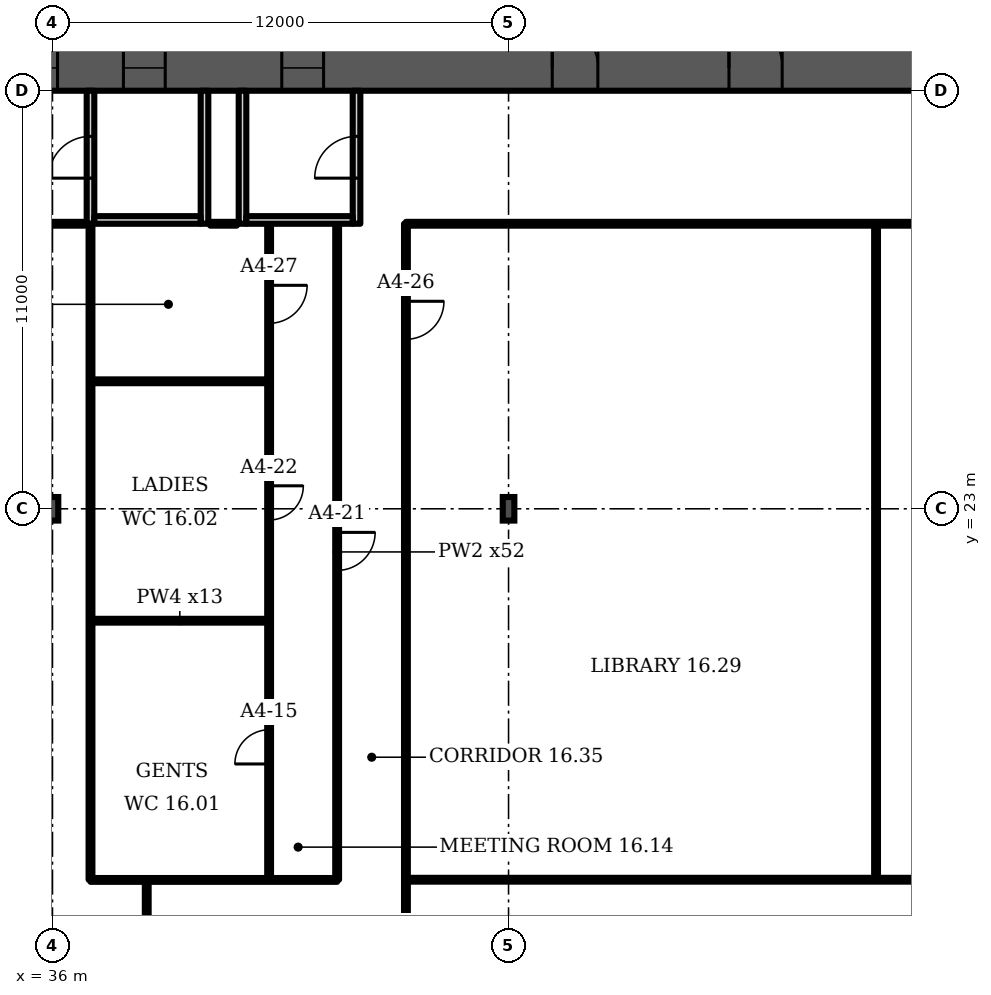
"""IFC4 building model, lengths in metres.
Left out: names, types, materials, properties, quantities, classifications, styles, units other than length and angle.
Written with IfcOpenShell. Run it as: python <this file> out.ifc"""

import sys

from ifc_helpers import new_model, si_unit, direction, frame, frame_2d, origin, origin_2d, place, context, subcontext, project, spatial, rectangle, i_section, extrude, element, fill, save


model = new_model("IFC4")
c1 = context("Model", 3, precision=1e-05, world=origin(), true_north=direction((0.0, 1.0)))
c2 = subcontext(c1, "Body", "Model", "MODEL_VIEW")
j1 = project(units=[si_unit("LENGTHUNIT", "METRE"), si_unit("PLANEANGLEUNIT", "RADIAN")], contexts=[c1])
p1 = place(None, origin())
s1 = spatial("IfcSite", under=j1, at=p1, CompositionType="ELEMENT")
p2 = place(p1, origin())
s2 = spatial("IfcBuilding", under=s1, at=p2, CompositionType="ELEMENT")
p3 = place(p2, frame((0.0, 0.0, 77.5)))
s3 = spatial("IfcBuildingStorey", under=s2, at=p3, CompositionType="ELEMENT", Elevation=77.5)
p4 = place(p3, frame((9.0, 34.6, 0.0), z_axis=(0.0, 0.0, 1.0), x_axis=(1.0, 0.0, 0.0)))
e1 = element("IfcWall", 1, at=p4, inside=s3, PredefinedType="SHEAR", context=c2, shape_type="SweptSolid", body=[
    extrude(rectangle(XDim=56.0, YDim=1.2, at=frame_2d((28.0, 0.0))), origin(), (0.0, 0.0, 1.0), 3.6),
])
p5 = place(p4, frame((3.3, 0.0, 0.0)))
e2 = element("IfcOpeningElement", 2, at=p5, cuts=e1, PredefinedType="OPENING", context=c2, shape_type="SweptSolid", body=[
    extrude(rectangle(XDim=1.0, YDim=2.1, at=frame_2d((0.5, 1.05))), frame((0.0, 0.61, 0.0), z_axis=(0.0, -1.0, 0.0), x_axis=(1.0, 0.0, 0.0)), (0.0, 0.0, 1.0), 1.22),
])
p6 = place(p4, frame((7.867, 0.0, 0.0)))
e3 = element("IfcOpeningElement", 3, at=p6, cuts=e1, PredefinedType="OPENING", context=c2, shape_type="SweptSolid", body=[
    extrude(rectangle(XDim=1.1, YDim=2.1, at=frame_2d((0.55, 1.05))), frame((0.0, 0.61, 0.0), z_axis=(0.0, -1.0, 0.0), x_axis=(1.0, 0.0, 0.0)), (0.0, 0.0, 1.0), 1.22),
])
p7 = place(p4, frame((12.033, 0.0, 0.0)))
e4 = element("IfcOpeningElement", 4, at=p7, cuts=e1, PredefinedType="OPENING", context=c2, shape_type="SweptSolid", body=[
    extrude(rectangle(XDim=1.1, YDim=2.1, at=frame_2d((0.55, 1.05))), frame((0.0, 0.61, 0.0), z_axis=(0.0, -1.0, 0.0), x_axis=(1.0, 0.0, 0.0)), (0.0, 0.0, 1.0), 1.22),
])
p8 = place(p4, frame((9.8, 0.0, 0.0)))
e5 = element("IfcOpeningElement", 5, at=p8, cuts=e1, PredefinedType="OPENING", context=c2, shape_type="SweptSolid", body=[
    extrude(rectangle(XDim=1.4, YDim=2.1, at=frame_2d((0.7, 1.05))), frame((0.0, 0.61, 0.0), z_axis=(0.0, -1.0, 0.0), x_axis=(1.0, 0.0, 0.0)), (0.0, 0.0, 1.0), 1.22),
])
p9 = place(p4, frame((14.65, 0.0, 0.0)))
e6 = element("IfcOpeningElement", 6, at=p9, cuts=e1, PredefinedType="OPENING", context=c2, shape_type="SweptSolid", body=[
    extrude(rectangle(XDim=1.2, YDim=2.1, at=frame_2d((0.6, 1.05))), frame((0.0, 0.61, 0.0), z_axis=(0.0, -1.0, 0.0), x_axis=(1.0, 0.0, 0.0)), (0.0, 0.0, 1.0), 1.22),
])
p10 = place(p4, frame((21.867, 0.0, 0.0)))
e7 = element("IfcOpeningElement", 7, at=p10, cuts=e1, PredefinedType="OPENING", context=c2, shape_type="SweptSolid", body=[
    extrude(rectangle(XDim=1.1, YDim=2.1, at=frame_2d((0.55, 1.05))), frame((0.0, 0.61, 0.0), z_axis=(0.0, -1.0, 0.0), x_axis=(1.0, 0.0, 0.0)), (0.0, 0.0, 1.0), 1.22),
])
p11 = place(p4, frame((26.033, 0.0, 0.0)))
e8 = element("IfcOpeningElement", 8, at=p11, cuts=e1, PredefinedType="OPENING", context=c2, shape_type="SweptSolid", body=[
    extrude(rectangle(XDim=1.1, YDim=2.1, at=frame_2d((0.55, 1.05))), frame((0.0, 0.61, 0.0), z_axis=(0.0, -1.0, 0.0), x_axis=(1.0, 0.0, 0.0)), (0.0, 0.0, 1.0), 1.22),
])
p12 = place(p4, frame((23.8, 0.0, 0.0)))
e9 = element("IfcOpeningElement", 9, at=p12, cuts=e1, PredefinedType="OPENING", context=c2, shape_type="SweptSolid", body=[
    extrude(rectangle(XDim=1.4, YDim=2.1, at=frame_2d((0.7, 1.05))), frame((0.0, 0.61, 0.0), z_axis=(0.0, -1.0, 0.0), x_axis=(1.0, 0.0, 0.0)), (0.0, 0.0, 1.0), 1.22),
])
p13 = place(p4, frame((28.867, 0.0, 0.0)))
e10 = element("IfcOpeningElement", 10, at=p13, cuts=e1, PredefinedType="OPENING", context=c2, shape_type="SweptSolid", body=[
    extrude(rectangle(XDim=1.1, YDim=2.1, at=frame_2d((0.55, 1.05))), frame((0.0, 0.61, 0.0), z_axis=(0.0, -1.0, 0.0), x_axis=(1.0, 0.0, 0.0)), (0.0, 0.0, 1.0), 1.22),
])
p14 = place(p4, frame((33.033, 0.0, 0.0)))
e11 = element("IfcOpeningElement", 11, at=p14, cuts=e1, PredefinedType="OPENING", context=c2, shape_type="SweptSolid", body=[
    extrude(rectangle(XDim=1.1, YDim=2.1, at=frame_2d((0.55, 1.05))), frame((0.0, 0.61, 0.0), z_axis=(0.0, -1.0, 0.0), x_axis=(1.0, 0.0, 0.0)), (0.0, 0.0, 1.0), 1.22),
])
p15 = place(p4, frame((40.15, 0.0, 0.0)))
e12 = element("IfcOpeningElement", 12, at=p15, cuts=e1, PredefinedType="OPENING", context=c2, shape_type="SweptSolid", body=[
    extrude(rectangle(XDim=1.2, YDim=2.1, at=frame_2d((0.6, 1.05))), frame((0.0, 0.61, 0.0), z_axis=(0.0, -1.0, 0.0), x_axis=(1.0, 0.0, 0.0)), (0.0, 0.0, 1.0), 1.22),
])
p16 = place(p4, frame((44.8, 0.0, 0.0)))
e13 = element("IfcOpeningElement", 13, at=p16, cuts=e1, PredefinedType="OPENING", context=c2, shape_type="SweptSolid", body=[
    extrude(rectangle(XDim=1.4, YDim=2.1, at=frame_2d((0.7, 1.05))), frame((0.0, 0.61, 0.0), z_axis=(0.0, -1.0, 0.0), x_axis=(1.0, 0.0, 0.0)), (0.0, 0.0, 1.0), 1.22),
])
p17 = place(p4, frame((49.867, 0.0, 0.0)))
e14 = element("IfcOpeningElement", 14, at=p17, cuts=e1, PredefinedType="OPENING", context=c2, shape_type="SweptSolid", body=[
    extrude(rectangle(XDim=1.1, YDim=2.1, at=frame_2d((0.55, 1.05))), frame((0.0, 0.61, 0.0), z_axis=(0.0, -1.0, 0.0), x_axis=(1.0, 0.0, 0.0)), (0.0, 0.0, 1.0), 1.22),
])
p18 = place(p4, frame((53.5, 0.0, 0.0)))
e15 = element("IfcOpeningElement", 15, at=p18, cuts=e1, PredefinedType="OPENING", context=c2, shape_type="SweptSolid", body=[
    extrude(rectangle(XDim=1.1, YDim=2.1, at=frame_2d((0.55, 1.05))), frame((0.0, 0.61, 0.0), z_axis=(0.0, -1.0, 0.0), x_axis=(1.0, 0.0, 0.0)), (0.0, 0.0, 1.0), 1.22),
])
p19 = place(p4, frame((51.567, 0.0, 0.0)))
e16 = element("IfcOpeningElement", 16, at=p19, cuts=e1, PredefinedType="OPENING", context=c2, shape_type="SweptSolid", body=[
    extrude(rectangle(XDim=1.4, YDim=2.1, at=frame_2d((0.7, 1.05))), frame((0.0, 0.61, 0.0), z_axis=(0.0, -1.0, 0.0), x_axis=(1.0, 0.0, 0.0)), (0.0, 0.0, 1.0), 1.22),
])
for number, where, z_axis, x_axis in (
    (17, (36.0, 23.0, 0.0), (0.0, 0.0, 1.0), (1.0, 0.0, 0.0)),
    (18, (48.0, 23.0, 0.0), (0.0, 0.0, 1.0), (1.0, 0.0, 0.0)),
):
    element("IfcColumn", number, at=place(p3, frame(where, z_axis=z_axis, x_axis=x_axis)), inside=s3, PredefinedType="COLUMN", context=c2, shape_type="SweptSolid", body=[
        extrude(i_section(OverallWidth=0.305, OverallDepth=0.62, WebThickness=0.021, FlangeThickness=0.04, FilletRadius=0.027, at=origin_2d()), origin(), (0.0, 0.0, 1.0), 3.6),
    ])
p20 = place(p3, frame((37.0, 30.5, 0.0), z_axis=(0.0, 0.0, 1.0), x_axis=(0.0, 1.0, 0.0)))
e19 = element("IfcWall", 19, at=p20, inside=s3, PredefinedType="PARTITIONING", context=c2, shape_type="SweptSolid", body=[
    extrude(rectangle(XDim=3.5, YDim=0.2, at=frame_2d((1.75, 0.0))), origin(), (0.0, 0.0, 1.0), 3.2),
])
p21 = place(p20, frame((1.2, 0.0, 0.0)))
e20 = element("IfcOpeningElement", 20, at=p21, cuts=e19, PredefinedType="OPENING", context=c2, shape_type="SweptSolid", body=[
    extrude(rectangle(XDim=1.1, YDim=2.1, at=frame_2d((0.55, 1.05))), frame((0.0, 0.11, 0.0), z_axis=(0.0, -1.0, 0.0), x_axis=(1.0, 0.0, 0.0)), (0.0, 0.0, 1.0), 0.22),
])
p22 = place(p3, frame((40.0, 30.5, 0.0), z_axis=(0.0, 0.0, 1.0), x_axis=(0.0, 1.0, 0.0)))
e21 = element("IfcWall", 21, at=p22, inside=s3, PredefinedType="PARTITIONING", context=c2, shape_type="SweptSolid", body=[
    extrude(rectangle(XDim=3.5, YDim=0.2, at=frame_2d((1.75, 0.0))), origin(), (0.0, 0.0, 1.0), 3.2),
])
p23 = place(p3, frame((37.1, 30.6, 0.0), z_axis=(0.0, 0.0, 1.0), x_axis=(1.0, 0.0, 0.0)))
e22 = element("IfcWall", 22, at=p23, inside=s3, PredefinedType="PARTITIONING", context=c2, shape_type="SweptSolid", body=[
    extrude(rectangle(XDim=2.8, YDim=0.2, at=frame_2d((1.4, 0.0))), origin(), (0.0, 0.0, 1.0), 3.2),
])
p24 = place(p3, frame((41.0, 30.5, 0.0), z_axis=(0.0, 0.0, 1.0), x_axis=(0.0, 1.0, 0.0)))
e23 = element("IfcWall", 23, at=p24, inside=s3, PredefinedType="PARTITIONING", context=c2, shape_type="SweptSolid", body=[
    extrude(rectangle(XDim=3.5, YDim=0.2, at=frame_2d((1.75, 0.0))), origin(), (0.0, 0.0, 1.0), 3.2),
])
p25 = place(p3, frame((44.0, 30.5, 0.0), z_axis=(0.0, 0.0, 1.0), x_axis=(0.0, 1.0, 0.0)))
e24 = element("IfcWall", 24, at=p25, inside=s3, PredefinedType="PARTITIONING", context=c2, shape_type="SweptSolid", body=[
    extrude(rectangle(XDim=3.5, YDim=0.2, at=frame_2d((1.75, 0.0))), origin(), (0.0, 0.0, 1.0), 3.2),
])
p26 = place(p25, frame((1.2, 0.0, 0.0)))
e25 = element("IfcOpeningElement", 25, at=p26, cuts=e24, PredefinedType="OPENING", context=c2, shape_type="SweptSolid", body=[
    extrude(rectangle(XDim=1.1, YDim=2.1, at=frame_2d((0.55, 1.05))), frame((0.0, 0.11, 0.0), z_axis=(0.0, -1.0, 0.0), x_axis=(1.0, 0.0, 0.0)), (0.0, 0.0, 1.0), 0.22),
])
p27 = place(p3, frame((41.1, 30.6, 0.0), z_axis=(0.0, 0.0, 1.0), x_axis=(1.0, 0.0, 0.0)))
e26 = element("IfcWall", 26, at=p27, inside=s3, PredefinedType="PARTITIONING", context=c2, shape_type="SweptSolid", body=[
    extrude(rectangle(XDim=2.8, YDim=0.2, at=frame_2d((1.4, 0.0))), origin(), (0.0, 0.0, 1.0), 3.2),
])
p28 = place(p3, frame((21.94, 30.5, 0.0), z_axis=(0.0, 0.0, 1.0), x_axis=(1.0, 0.0, 0.0)))
e27 = element("IfcWall", 27, at=p28, inside=s3, PredefinedType="PARTITIONING", context=c2, shape_type="SweptSolid", body=[
    extrude(rectangle(XDim=14.91, YDim=0.1, at=frame_2d((7.455, 0.0))), origin(), (0.0, 0.0, 1.0), 3.2),
])
p29 = place(p28, frame((0.345, 0.0, 0.0)))
e28 = element("IfcOpeningElement", 28, at=p29, cuts=e27, PredefinedType="OPENING", context=c2, shape_type="SweptSolid", body=[
    extrude(rectangle(XDim=1.0, YDim=2.1, at=frame_2d((0.5, 1.05))), frame((0.0, 0.06, 0.0), z_axis=(0.0, -1.0, 0.0), x_axis=(1.0, 0.0, 0.0)), (0.0, 0.0, 1.0), 0.12),
])
p30 = place(p28, frame((8.95, 0.0, 0.0)))
e29 = element("IfcOpeningElement", 29, at=p30, cuts=e27, PredefinedType="OPENING", context=c2, shape_type="SweptSolid", body=[
    extrude(rectangle(XDim=1.8, YDim=2.1, at=frame_2d((0.9, 1.05))), frame((0.0, 0.06, 0.0), z_axis=(0.0, -1.0, 0.0), x_axis=(1.0, 0.0, 0.0)), (0.0, 0.0, 1.0), 0.12),
])
p31 = place(p3, frame((37.0, 13.235, 0.0), z_axis=(0.0, 0.0, 1.0), x_axis=(1.0, 0.0, 0.0)))
e30 = element("IfcWall", 30, at=p31, inside=s3, PredefinedType="PARTITIONING", context=c2, shape_type="SweptSolid", body=[
    extrude(rectangle(XDim=6.49, YDim=0.1, at=frame_2d((3.245, 0.0))), origin(), (0.0, 0.0, 1.0), 3.2),
])
p32 = place(p3, frame((37.0, 13.24, 0.0), z_axis=(0.0, 0.0, 1.0), x_axis=(0.0, 1.0, 0.0)))
e31 = element("IfcWall", 31, at=p32, inside=s3, PredefinedType="PARTITIONING", context=c2, shape_type="SweptSolid", body=[
    extrude(rectangle(XDim=17.26, YDim=0.1, at=frame_2d((8.63, 0.0))), origin(), (0.0, 0.0, 1.0), 3.2),
])
for number, where, z_axis, x_axis in (
    (32, (37.0, 20.055, 0.0), (0.0, 0.0, 1.0), (1.0, 0.0, 0.0)),
    (33, (37.0, 26.355, 0.0), (0.0, 0.0, 1.0), (1.0, 0.0, 0.0)),
):
    element("IfcWall", number, at=place(p3, frame(where, z_axis=z_axis, x_axis=x_axis)), inside=s3, PredefinedType="PARTITIONING", context=c2, shape_type="SweptSolid", body=[
        extrude(rectangle(XDim=4.7, YDim=0.1, at=frame_2d((2.35, 0.0))), origin(), (0.0, 0.0, 1.0), 3.2),
    ])
p33 = place(p3, frame((38.48, 7.28, 0.0), z_axis=(0.0, 0.0, 1.0), x_axis=(0.0, 1.0, 0.0)))
e34 = element("IfcWall", 34, at=p33, inside=s3, PredefinedType="PARTITIONING", context=c2, shape_type="SweptSolid", body=[
    extrude(rectangle(XDim=5.955, YDim=0.1, at=frame_2d((2.978, 0.0))), origin(), (0.0, 0.0, 1.0), 3.2),
])
p34 = place(p3, frame((41.7, 13.24, 0.0), z_axis=(0.0, 0.0, 1.0), x_axis=(0.0, 1.0, 0.0)))
e35 = element("IfcWall", 35, at=p34, inside=s3, PredefinedType="PARTITIONING", context=c2, shape_type="SweptSolid", body=[
    extrude(rectangle(XDim=17.25, YDim=0.1, at=frame_2d((8.625, 0.0))), origin(), (0.0, 0.0, 1.0), 3.2),
])
p35 = place(p34, frame((3.046, 0.0, 0.0)))
e36 = element("IfcOpeningElement", 36, at=p35, cuts=e35, PredefinedType="OPENING", context=c2, shape_type="SweptSolid", body=[
    extrude(rectangle(XDim=0.9, YDim=2.1, at=frame_2d((0.45, 1.05))), frame((0.0, 0.06, 0.0), z_axis=(0.0, -1.0, 0.0), x_axis=(1.0, 0.0, 0.0)), (0.0, 0.0, 1.0), 0.12),
])
p36 = place(p34, frame((9.465, 0.0, 0.0)))
e37 = element("IfcOpeningElement", 37, at=p36, cuts=e35, PredefinedType="OPENING", context=c2, shape_type="SweptSolid", body=[
    extrude(rectangle(XDim=0.9, YDim=2.1, at=frame_2d((0.45, 1.05))), frame((0.0, 0.06, 0.0), z_axis=(0.0, -1.0, 0.0), x_axis=(1.0, 0.0, 0.0)), (0.0, 0.0, 1.0), 0.12),
])
p37 = place(p34, frame((14.64, 0.0, 0.0)))
e38 = element("IfcOpeningElement", 38, at=p37, cuts=e35, PredefinedType="OPENING", context=c2, shape_type="SweptSolid", body=[
    extrude(rectangle(XDim=1.0, YDim=2.1, at=frame_2d((0.5, 1.05))), frame((0.0, 0.06, 0.0), z_axis=(0.0, -1.0, 0.0), x_axis=(1.0, 0.0, 0.0)), (0.0, 0.0, 1.0), 0.12),
])
p38 = place(p3, frame((43.49, 13.24, 0.0), z_axis=(0.0, 0.0, 1.0), x_axis=(0.0, 1.0, 0.0)))
e39 = element("IfcWall", 39, at=p38, inside=s3, PredefinedType="PARTITIONING", context=c2, shape_type="SweptSolid", body=[
    extrude(rectangle(XDim=17.25, YDim=0.1, at=frame_2d((8.625, 0.0))), origin(), (0.0, 0.0, 1.0), 3.2),
])
p39 = place(p38, frame((8.139, 0.0, 0.0)))
e40 = element("IfcOpeningElement", 40, at=p39, cuts=e39, PredefinedType="OPENING", context=c2, shape_type="SweptSolid", body=[
    extrude(rectangle(XDim=1.0, YDim=2.1, at=frame_2d((0.5, 1.05))), frame((0.0, 0.06, 0.0), z_axis=(0.0, -1.0, 0.0), x_axis=(1.0, 0.0, 0.0)), (0.0, 0.0, 1.0), 0.12),
])
p40 = place(p3, frame((45.3, -3.943, 0.0), z_axis=(0.0, 0.0, 1.0), x_axis=(0.0, 1.0, 0.0)))
e41 = element("IfcWall", 41, at=p40, inside=s3, PredefinedType="PARTITIONING", context=c2, shape_type="SweptSolid", body=[
    extrude(rectangle(XDim=34.443, YDim=0.1, at=frame_2d((17.222, 0.0))), origin(), (0.0, 0.0, 1.0), 2.58),
])
p41 = place(p40, frame((1.598, 0.0, 0.0)))
e42 = element("IfcOpeningElement", 42, at=p41, cuts=e41, PredefinedType="OPENING", context=c2, shape_type="SweptSolid", body=[
    extrude(rectangle(XDim=1.0, YDim=2.1, at=frame_2d((0.5, 1.05))), frame((0.0, 0.06, 0.0), z_axis=(0.0, -1.0, 0.0), x_axis=(1.0, 0.0, 0.0)), (0.0, 0.0, 1.0), 0.12),
])
p42 = place(p40, frame((5.853, 0.0, 0.0)))
e43 = element("IfcOpeningElement", 43, at=p42, cuts=e41, PredefinedType="OPENING", context=c2, shape_type="SweptSolid", body=[
    extrude(rectangle(XDim=1.0, YDim=2.1, at=frame_2d((0.5, 1.05))), frame((0.0, 0.06, 0.0), z_axis=(0.0, -1.0, 0.0), x_axis=(1.0, 0.0, 0.0)), (0.0, 0.0, 1.0), 0.12),
])
p43 = place(p40, frame((10.173, 0.0, 0.0)))
e44 = element("IfcOpeningElement", 44, at=p43, cuts=e41, PredefinedType="OPENING", context=c2, shape_type="SweptSolid", body=[
    extrude(rectangle(XDim=1.0, YDim=2.1, at=frame_2d((0.5, 1.05))), frame((0.0, 0.06, 0.0), z_axis=(0.0, -1.0, 0.0), x_axis=(1.0, 0.0, 0.0)), (0.0, 0.0, 1.0), 0.12),
])
p44 = place(p40, frame((14.488, 0.0, 0.0)))
e45 = element("IfcOpeningElement", 45, at=p44, cuts=e41, PredefinedType="OPENING", context=c2, shape_type="SweptSolid", body=[
    extrude(rectangle(XDim=1.0, YDim=2.1, at=frame_2d((0.5, 1.05))), frame((0.0, 0.06, 0.0), z_axis=(0.0, -1.0, 0.0), x_axis=(1.0, 0.0, 0.0)), (0.0, 0.0, 1.0), 0.12),
])
p45 = place(p40, frame((31.403, 0.0, 0.0)))
e46 = element("IfcOpeningElement", 46, at=p45, cuts=e41, PredefinedType="OPENING", context=c2, shape_type="SweptSolid", body=[
    extrude(rectangle(XDim=1.0, YDim=2.1, at=frame_2d((0.5, 1.05))), frame((0.0, 0.06, 0.0), z_axis=(0.0, -1.0, 0.0), x_axis=(1.0, 0.0, 0.0)), (0.0, 0.0, 1.0), 0.12),
])
p46 = place(p3, frame((45.3, 13.24, 0.0), z_axis=(0.0, 0.0, 1.0), x_axis=(1.0, 0.0, 0.0)))
e47 = element("IfcWall", 47, at=p46, inside=s3, PredefinedType="PARTITIONING", context=c2, shape_type="SweptSolid", body=[
    extrude(rectangle(XDim=27.56, YDim=0.1, at=frame_2d((13.78, 0.0))), origin(), (0.0, 0.0, 1.0), 3.2),
])
p47 = place(p3, frame((45.3, 30.5, 0.0), z_axis=(0.0, 0.0, 1.0), x_axis=(1.0, 0.0, 0.0)))
e48 = element("IfcWall", 48, at=p47, inside=s3, PredefinedType="PARTITIONING", context=c2, shape_type="SweptSolid", body=[
    extrude(rectangle(XDim=19.7, YDim=0.1, at=frame_2d((9.85, 0.0))), origin(), (0.0, 0.0, 1.0), 3.2),
])
p48 = place(p3, frame((57.67, 13.24, 0.0), z_axis=(0.0, 0.0, 1.0), x_axis=(0.0, 1.0, 0.0)))
e49 = element("IfcWall", 49, at=p48, inside=s3, PredefinedType="PARTITIONING", context=c2, shape_type="SweptSolid", body=[
    extrude(rectangle(XDim=17.26, YDim=0.1, at=frame_2d((8.63, 0.0))), origin(), (0.0, 0.0, 1.0), 3.2),
])
p49 = place(p3, frame((40.15, 30.5, 0.0), z_axis=(0.0, 0.0, 1.0), x_axis=(1.0, 0.0, 0.0)))
e50 = element("IfcWall", 50, at=p49, inside=s3, PredefinedType="PARTITIONING", context=c2, shape_type="SweptSolid", body=[
    extrude(rectangle(XDim=0.7, YDim=0.1, at=frame_2d((0.35, 0.0))), origin(), (0.0, 0.0, 1.0), 3.2),
])
p50 = place(p11, origin())
e51 = element("IfcDoor", 51, at=p50, inside=s3, OperationType="DOUBLE_DOOR_SLIDING", PredefinedType="DOOR", context=c2, shape_type="SweptSolid", body=[
    extrude(rectangle(XDim=1.1, YDim=2.1, at=frame_2d((0.55, 1.05))), frame((0.0, 0.025, 0.0), z_axis=(0.0, -1.0, 0.0), x_axis=(1.0, 0.0, 0.0)), (0.0, 0.0, 1.0), 0.05),
])
fill(e8, e51)
p51 = place(p13, origin())
e52 = element("IfcDoor", 52, at=p51, inside=s3, OperationType="DOUBLE_DOOR_SLIDING", PredefinedType="DOOR", context=c2, shape_type="SweptSolid", body=[
    extrude(rectangle(XDim=1.1, YDim=2.1, at=frame_2d((0.55, 1.05))), frame((0.0, 0.025, 0.0), z_axis=(0.0, -1.0, 0.0), x_axis=(1.0, 0.0, 0.0)), (0.0, 0.0, 1.0), 0.05),
])
fill(e10, e52)
p52 = place(p14, origin())
e53 = element("IfcDoor", 53, at=p52, inside=s3, OperationType="DOUBLE_DOOR_SLIDING", PredefinedType="DOOR", context=c2, shape_type="SweptSolid", body=[
    extrude(rectangle(XDim=1.1, YDim=2.1, at=frame_2d((0.55, 1.05))), frame((0.0, 0.025, 0.0), z_axis=(0.0, -1.0, 0.0), x_axis=(1.0, 0.0, 0.0)), (0.0, 0.0, 1.0), 0.05),
])
fill(e11, e53)
p53 = place(p15, origin())
e54 = element("IfcDoor", 54, at=p53, inside=s3, OperationType="SINGLE_SWING_LEFT", PredefinedType="DOOR", context=c2, shape_type="SweptSolid", body=[
    extrude(rectangle(XDim=1.2, YDim=2.1, at=frame_2d((0.6, 1.05))), frame((0.0, 0.025, 0.0), z_axis=(0.0, -1.0, 0.0), x_axis=(1.0, 0.0, 0.0)), (0.0, 0.0, 1.0), 0.05),
])
fill(e12, e54)
p54 = place(p16, origin())
e55 = element("IfcDoor", 55, at=p54, inside=s3, OperationType="DOUBLE_DOOR_SINGLE_SWING", PredefinedType="DOOR", context=c2, shape_type="SweptSolid", body=[
    extrude(rectangle(XDim=1.4, YDim=2.1, at=frame_2d((0.7, 1.05))), frame((0.0, 0.025, 0.0), z_axis=(0.0, -1.0, 0.0), x_axis=(1.0, 0.0, 0.0)), (0.0, 0.0, 1.0), 0.05),
])
fill(e13, e55)
p55 = place(p21, origin())
e56 = element("IfcDoor", 56, at=p55, inside=s3, OperationType="SINGLE_SWING_LEFT", PredefinedType="DOOR", context=c2, shape_type="SweptSolid", body=[
    extrude(rectangle(XDim=1.1, YDim=2.1, at=frame_2d((0.55, 1.05))), frame((0.0, 0.025, 0.0), z_axis=(0.0, -1.0, 0.0), x_axis=(1.0, 0.0, 0.0)), (0.0, 0.0, 1.0), 0.05),
])
fill(e20, e56)
p56 = place(p26, origin())
e57 = element("IfcDoor", 57, at=p56, inside=s3, OperationType="SINGLE_SWING_LEFT", PredefinedType="DOOR", context=c2, shape_type="SweptSolid", body=[
    extrude(rectangle(XDim=1.1, YDim=2.1, at=frame_2d((0.55, 1.05))), frame((0.0, 0.025, 0.0), z_axis=(0.0, -1.0, 0.0), x_axis=(1.0, 0.0, 0.0)), (0.0, 0.0, 1.0), 0.05),
])
fill(e25, e57)
p57 = place(p35, origin())
e58 = element("IfcDoor", 58, at=p57, inside=s3, OperationType="SINGLE_SWING_LEFT", PredefinedType="DOOR", context=c2, shape_type="SweptSolid", body=[
    extrude(rectangle(XDim=0.9, YDim=2.1, at=frame_2d((0.45, 1.05))), frame((0.0, 0.025, 0.0), z_axis=(0.0, -1.0, 0.0), x_axis=(1.0, 0.0, 0.0)), (0.0, 0.0, 1.0), 0.05),
])
fill(e36, e58)
p58 = place(p39, origin())
e59 = element("IfcDoor", 59, at=p58, inside=s3, OperationType="SINGLE_SWING_RIGHT", PredefinedType="DOOR", context=c2, shape_type="SweptSolid", body=[
    extrude(rectangle(XDim=1.0, YDim=2.1, at=frame_2d((0.5, 1.05))), frame((0.0, 0.025, 0.0), z_axis=(0.0, -1.0, 0.0), x_axis=(1.0, 0.0, 0.0)), (0.0, 0.0, 1.0), 0.05),
])
fill(e40, e59)
p59 = place(p36, origin())
e60 = element("IfcDoor", 60, at=p59, inside=s3, OperationType="SINGLE_SWING_RIGHT", PredefinedType="DOOR", context=c2, shape_type="SweptSolid", body=[
    extrude(rectangle(XDim=0.9, YDim=2.1, at=frame_2d((0.45, 1.05))), frame((0.0, 0.025, 0.0), z_axis=(0.0, -1.0, 0.0), x_axis=(1.0, 0.0, 0.0)), (0.0, 0.0, 1.0), 0.05),
])
fill(e37, e60)
p60 = place(p45, origin())
e61 = element("IfcDoor", 61, at=p60, inside=s3, OperationType="SINGLE_SWING_RIGHT", PredefinedType="DOOR", context=c2, shape_type="SweptSolid", body=[
    extrude(rectangle(XDim=1.0, YDim=2.1, at=frame_2d((0.5, 1.05))), frame((0.0, 0.025, 0.0), z_axis=(0.0, -1.0, 0.0), x_axis=(1.0, 0.0, 0.0)), (0.0, 0.0, 1.0), 0.05),
])
fill(e46, e61)
p61 = place(p37, origin())
e62 = element("IfcDoor", 62, at=p61, inside=s3, OperationType="SINGLE_SWING_RIGHT", PredefinedType="DOOR", context=c2, shape_type="SweptSolid", body=[
    extrude(rectangle(XDim=1.0, YDim=2.1, at=frame_2d((0.5, 1.05))), frame((0.0, 0.025, 0.0), z_axis=(0.0, -1.0, 0.0), x_axis=(1.0, 0.0, 0.0)), (0.0, 0.0, 1.0), 0.05),
])
fill(e38, e62)
save(model, sys.argv[1])
